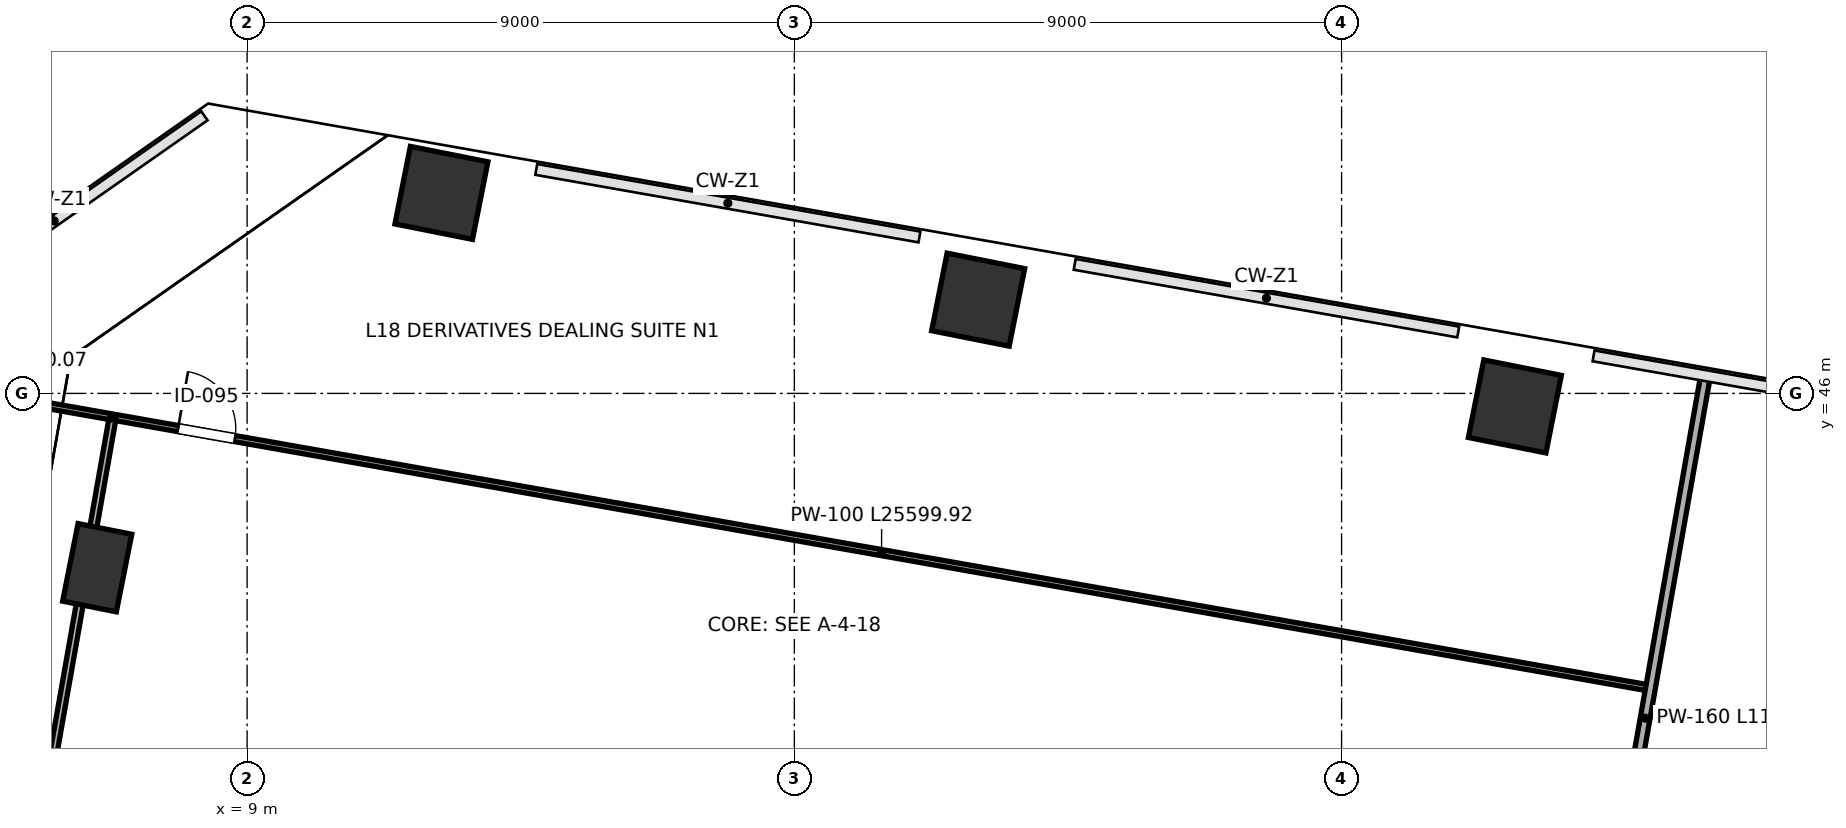
"""IFC4 building model, lengths in metres.
Left out: names, types, materials, properties, quantities, classifications, styles, units other than length and angle.
Written with IfcOpenShell. Run it as: python <this file> out.ifc"""

import sys

from ifc_helpers import new_model, si_unit, direction, frame, frame_2d, origin, origin_2d, place, context, subcontext, project, spatial, rectangle, extrude, clip, halfspace, source, transform, mapped, element, fill, save


model = new_model("IFC4")
c1 = context("Model", 3, precision=1e-05, world=origin(), true_north=direction((0.0, 1.0)))
c2 = subcontext(c1, "Body", "Model", "MODEL_VIEW")
j1 = project(units=[si_unit("LENGTHUNIT", "METRE"), si_unit("PLANEANGLEUNIT", "RADIAN")], contexts=[c1])
p1 = place(None, origin())
s1 = spatial("IfcSite", under=j1, at=p1, CompositionType="ELEMENT")
p2 = place(p1, origin())
s2 = spatial("IfcBuilding", under=s1, at=p2, CompositionType="ELEMENT")
p3 = place(p2, frame((0.0, 0.0, 83.2)))
s3 = spatial("IfcBuildingStorey", under=s2, at=p3, CompositionType="ELEMENT", Elevation=83.2)
p4 = place(p3, frame((12.196, 49.298, 0.0), z_axis=(0.08992438855, 0.047072959666, 0.994835534554), x_axis=(0.282913077734, -0.95894112648, 0.019801676514)))
e1 = element("IfcColumn", 1, at=p4, inside=s3, PredefinedType="COLUMN", context=c2, shape_type="Clipping", body=[
    clip(clip(extrude(rectangle(XDim=1.3, YDim=1.3, at=origin_2d()), origin(), (0.0, 0.0, 1.0), 4.222), halfspace(frame((0.0, 0.0, 0.079), z_axis=(0.0, 0.0, -1.0), x_axis=(1.0, 0.0, 0.0)), False)), halfspace(frame((0.0, 0.0, 4.143), z_axis=(0.0, 0.0, 1.0), x_axis=(1.0, 0.0, 0.0)), False)),
])
p5 = place(p3, frame((21.023, 47.542, 0.0), z_axis=(0.08047972565, 0.001564400715, 0.996755018252), x_axis=(-0.175359189945, -0.984379269258, 0.015703781614)))
e2 = element("IfcColumn", 2, at=p5, inside=s3, PredefinedType="COLUMN", context=c2, shape_type="Clipping", body=[
    clip(clip(extrude(rectangle(XDim=1.3, YDim=1.3, at=origin_2d()), origin(), (0.0, 0.0, 1.0), 4.214), halfspace(frame((0.0, 0.0, 0.062), z_axis=(0.0, 0.0, -1.0), x_axis=(1.0, 0.0, 0.0)), False)), halfspace(frame((0.0, 0.0, 4.151), z_axis=(0.0, 0.0, 1.0), x_axis=(1.0, 0.0, 0.0)), False)),
])
p6 = place(p3, frame((29.85, 45.786, 0.0), z_axis=(0.070902338446, -0.043966401046, 0.996513830301), x_axis=(-0.682096199102, -0.731081301131, 0.016275942576)))
e3 = element("IfcColumn", 3, at=p6, inside=s3, PredefinedType="COLUMN", context=c2, shape_type="Clipping", body=[
    clip(clip(extrude(rectangle(XDim=1.3, YDim=1.3, at=origin_2d()), origin(), (0.0, 0.0, 1.0), 4.215), halfspace(frame((0.0, 0.0, 0.065), z_axis=(0.0, 0.0, -1.0), x_axis=(1.0, 0.0, 0.0)), False)), halfspace(frame((0.0, 0.0, 4.15), z_axis=(0.0, 0.0, 1.0), x_axis=(1.0, 0.0, 0.0)), False)),
])
p7 = place(p3, frame((6.534, 43.134, 0.0), z_axis=(0.058436761901, 0.076777804992, 0.995334272252), x_axis=(0.662840315572, -0.748524139363, 0.018823624612)))
e4 = element("IfcColumn", 4, at=p7, inside=s3, PredefinedType="PILASTER", context=c2, shape_type="Clipping", body=[
    clip(clip(extrude(rectangle(XDim=0.9, YDim=1.3, at=origin_2d()), origin(), (0.0, 0.0, 1.0), 4.22), halfspace(frame((0.0, 0.0, 0.071), z_axis=(0.0, 0.0, -1.0), x_axis=(1.0, 0.0, 0.0)), False)), halfspace(frame((0.0, 0.0, 4.149), z_axis=(0.0, 0.0, 1.0), x_axis=(1.0, 0.0, 0.0)), False)),
])
p8 = place(p3, frame((6.83, 45.604, 0.0), z_axis=(0.0, 0.0, 1.0), x_axis=(0.984806496121, -0.173655305701, 0.0)))
e5 = element("IfcWall", 5, at=p8, inside=s3, PredefinedType="PARTITIONING", context=c2, shape_type="SweptSolid", body=[
    extrude(rectangle(XDim=25.6, YDim=0.1, at=frame_2d((12.8, 0.0))), origin(), (0.0, 0.0, 1.0), 3.96),
])
p9 = place(p8, frame((1.05, 0.0, 0.0)))
e6 = element("IfcOpeningElement", 6, at=p9, cuts=e5, PredefinedType="OPENING", context=c2, shape_type="SweptSolid", body=[
    extrude(rectangle(XDim=0.95, YDim=2.15, at=frame_2d((0.475, 1.075))), frame((0.0, 0.06, 0.0), z_axis=(0.0, -1.0, 0.0), x_axis=(1.0, 0.0, 0.0)), (0.0, 0.0, 1.0), 0.12),
])
p10 = place(p3, frame((2.607, 21.887, 0.0), z_axis=(0.0, 0.0, 1.0), x_axis=(0.173659666579, 0.984805727138, 0.0)))
e7 = element("IfcWall", 7, at=p10, inside=s3, PredefinedType="PARTITIONING", context=c2, shape_type="SweptSolid", body=[
    extrude(rectangle(XDim=24.05, YDim=0.115, at=frame_2d((12.025, 0.0))), origin(), (0.0, 0.0, 1.0), 3.095),
])
p11 = place(p10, frame((2.6, 0.0, 0.0)))
e8 = element("IfcOpeningElement", 8, at=p11, cuts=e7, PredefinedType="OPENING", context=c2, shape_type="SweptSolid", body=[
    extrude(rectangle(XDim=0.95, YDim=2.15, at=frame_2d((0.475, 1.075))), frame((0.0, 0.067, 0.0), z_axis=(0.0, -1.0, 0.0), x_axis=(1.0, 0.0, 0.0)), (0.0, 0.0, 1.0), 0.135),
])
p12 = place(p3, frame((3.176, 46.249, 0.0), z_axis=(0.0, 0.0, 1.0), x_axis=(0.984795743306, -0.173716274326, 0.0)))
e9 = element("IfcWall", 9, at=p12, inside=s3, PredefinedType="PARTITIONING", context=c2, shape_type="SweptSolid", body=[
    extrude(rectangle(XDim=3.63, YDim=0.1, at=frame_2d((1.815, 0.0))), origin(), (0.0, 0.0, 1.0), 3.96),
])
p13 = place(p3, frame((31.009, 35.076, 0.0), z_axis=(0.0, 0.0, 1.0), x_axis=(0.173653918008, 0.984806740818, 0.0)))
e10 = element("IfcWall", 10, at=p13, inside=s3, PredefinedType="PARTITIONING", context=c2, shape_type="SweptSolid", body=[
    extrude(rectangle(XDim=11.34, YDim=0.16, at=frame_2d((5.67, 0.0))), origin(), (0.0, 0.0, 1.0), 3.095),
])
m1 = source(origin(), c2, "Body", "SweptSolid", [
    extrude(rectangle(XDim=0.95, YDim=2.15, at=frame_2d((0.475, 1.075))), frame((0.0, 0.025, 0.0), z_axis=(0.0, -1.0, 0.0), x_axis=(1.0, 0.0, 0.0)), (0.0, 0.0, 1.0), 0.05),
])
p14 = place(p9, origin())
e11 = element("IfcDoor", 11, at=p14, inside=s3, OperationType="SINGLE_SWING_LEFT", PredefinedType="DOOR", context=c2, shape_type="MappedRepresentation", body=[
    mapped(m1, transform((0.0, 0.0, 0.0), scale=1.0)),
])
fill(e6, e11)
save(model, sys.argv[1])
